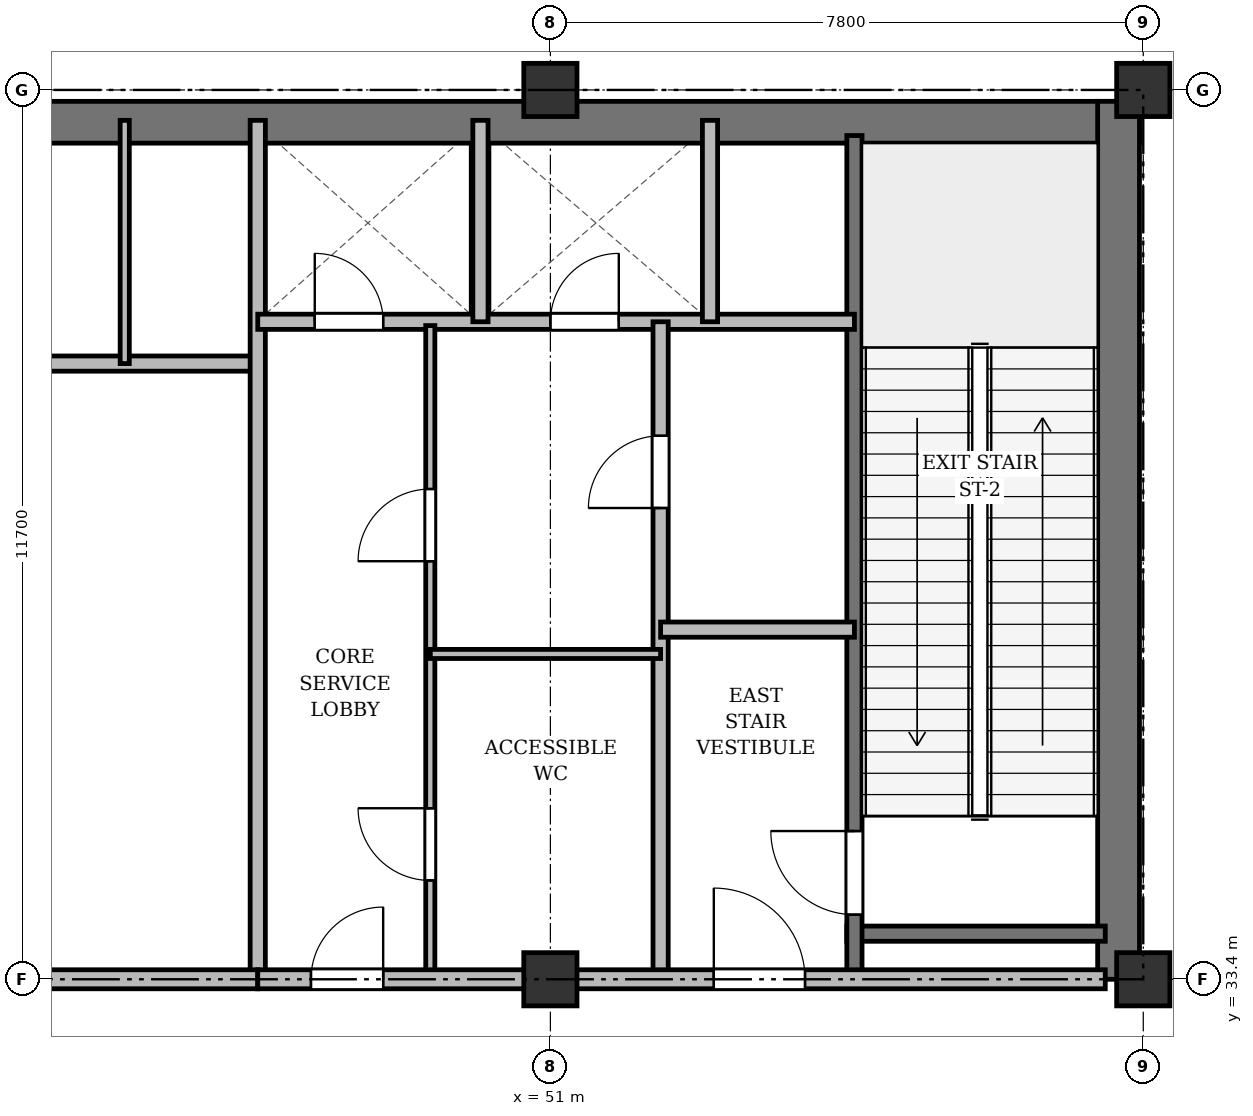
"""IFC4 building model, lengths in metres.
Left out: names, types, materials, properties, quantities, classifications, styles, units other than length and angle.
Written with IfcOpenShell. Run it as: python <this file> out.ifc"""

import sys

from ifc_helpers import new_model, si_unit, direction, frame, frame_2d, origin, origin_2d, place, context, subcontext, project, spatial, rectangle, extrude, source, transform, mapped, element, fill, save


model = new_model("IFC4")
c1 = context("Model", 3, precision=1e-05, world=origin(), true_north=direction((0.0, 1.0)))
c2 = subcontext(c1, "Body", "Model", "MODEL_VIEW")
j1 = project(units=[si_unit("LENGTHUNIT", "METRE"), si_unit("PLANEANGLEUNIT", "RADIAN")], contexts=[c1])
p1 = place(None, origin())
s1 = spatial("IfcSite", under=j1, at=p1, CompositionType="ELEMENT")
p2 = place(p1, origin())
s2 = spatial("IfcBuilding", under=s1, at=p2, CompositionType="ELEMENT")
p3 = place(p2, frame((0.0, 0.0, 182.5)))
s3 = spatial("IfcBuildingStorey", under=s2, at=p3, CompositionType="ELEMENT", Elevation=182.5)
m1 = source(origin(), c2, "Body", "SweptSolid", [
    extrude(rectangle(XDim=0.7, YDim=0.7, at=origin_2d()), origin(), (0.0, 0.0, 1.0), 8.0),
])
for number, where, z_axis, x_axis in (
    (1, (51.0, 33.4, 0.0), (0.0, 0.0, 1.0), (1.0, 0.0, 0.0)),
    (2, (51.0, 45.1, 0.0), (0.0, 0.0, 1.0), (1.0, 0.0, 0.0)),
    (3, (58.8, 33.4, 0.0), (0.0, 0.0, 1.0), (1.0, 0.0, 0.0)),
    (4, (58.8, 45.1, 0.0), (0.0, 0.0, 1.0), (1.0, 0.0, 0.0)),
):
    element("IfcColumn", number, at=place(p3, frame(where, z_axis=z_axis, x_axis=x_axis)), inside=s3, PredefinedType="COLUMN", context=c2, shape_type="MappedRepresentation", body=[
        mapped(m1, transform((0.0, 0.0, 0.0), x_axis=(1.0, 0.0, 0.0), y_axis=(0.0, 1.0, 0.0), z_axis=(0.0, 0.0, 1.0), scale=1.0)),
    ])
p4 = place(p3, frame((15.65, 44.675, 0.0), z_axis=(0.0, 0.0, 1.0), x_axis=(1.0, 0.0, 0.0)))
e5 = element("IfcWall", 5, at=p4, inside=s3, PredefinedType="SHEAR", context=c2, shape_type="SweptSolid", body=[
    extrude(rectangle(XDim=43.1, YDim=0.55, at=frame_2d((21.55, 0.0))), origin(), (0.0, 0.0, 1.0), 7.62),
])
p5 = place(p3, frame((58.475, 33.4, 0.0), z_axis=(0.0, 0.0, 1.0), x_axis=(0.0, 1.0, 0.0)))
e6 = element("IfcWall", 6, at=p5, inside=s3, PredefinedType="SHEAR", context=c2, shape_type="SweptSolid", body=[
    extrude(rectangle(XDim=11.55, YDim=0.55, at=frame_2d((5.775, 0.0))), origin(), (0.0, 0.0, 1.0), 7.62),
])
p6 = place(p3, frame((54.9, 34.0, 0.0), z_axis=(0.0, 0.0, 1.0), x_axis=(1.0, 0.0, 0.0)))
e7 = element("IfcWall", 7, at=p6, inside=s3, PredefinedType="SHEAR", context=c2, shape_type="SweptSolid", body=[
    extrude(rectangle(XDim=3.4, YDim=0.2, at=frame_2d((1.7, 0.0))), origin(), (0.0, 0.0, 1.0), 7.62),
])
p7 = place(p3, frame((55.0, 33.4, 0.0), z_axis=(0.0, 0.0, 1.0), x_axis=(0.0, 1.0, 0.0)))
e8 = element("IfcWall", 8, at=p7, inside=s3, PredefinedType="SHEAR", context=c2, shape_type="SweptSolid", body=[
    extrude(rectangle(XDim=11.1, YDim=0.2, at=frame_2d((5.55, 0.0))), origin(), (0.0, 0.0, 1.0), 7.62),
])
p8 = place(p7, frame((0.85, 0.0, 0.0)))
e9 = element("IfcOpeningElement", 9, at=p8, cuts=e8, PredefinedType="OPENING", context=c2, shape_type="SweptSolid", body=[
    extrude(rectangle(XDim=1.1, YDim=2.15, at=frame_2d((0.55, 1.075))), frame((0.0, 0.11, 0.0), z_axis=(0.0, -1.0, 0.0), x_axis=(1.0, 0.0, 0.0)), (0.0, 0.0, 1.0), 0.22),
])
p9 = place(p3, frame((40.25, 41.5, 0.0), z_axis=(0.0, 0.0, 1.0), x_axis=(1.0, 0.0, 0.0)))
e10 = element("IfcWall", 10, at=p9, inside=s3, PredefinedType="SOLIDWALL", context=c2, shape_type="SweptSolid", body=[
    extrude(rectangle(XDim=6.9, YDim=0.2, at=frame_2d((3.45, 0.0))), origin(), (0.0, 0.0, 1.0), 7.12),
])
p10 = place(p3, frame((45.4, 41.5, 0.0), z_axis=(0.0, 0.0, 1.0), x_axis=(0.0, 1.0, 0.0)))
e11 = element("IfcWall", 11, at=p10, inside=s3, PredefinedType="PARTITIONING", context=c2, shape_type="SweptSolid", body=[
    extrude(rectangle(XDim=3.2, YDim=0.12, at=frame_2d((1.6, 0.0))), origin(), (0.0, 0.0, 1.0), 7.62),
])
p11 = place(p3, frame((47.15, 33.4, 0.0), z_axis=(0.0, 0.0, 1.0), x_axis=(0.0, 1.0, 0.0)))
e12 = element("IfcWall", 12, at=p11, inside=s3, PredefinedType="SOLIDWALL", context=c2, shape_type="SweptSolid", body=[
    extrude(rectangle(XDim=11.3, YDim=0.2, at=frame_2d((5.65, 0.0))), origin(), (0.0, 0.0, 1.0), 7.02),
])
p12 = place(p3, frame((33.3, 33.4, 0.0), z_axis=(0.0, 0.0, 1.0), x_axis=(1.0, 0.0, 0.0)))
e13 = element("IfcWall", 13, at=p12, inside=s3, PredefinedType="PARTITIONING", context=c2, shape_type="SweptSolid", body=[
    extrude(rectangle(XDim=13.85, YDim=0.25, at=frame_2d((6.925, 0.0))), origin(), (0.0, 0.0, 1.0), 7.02),
])
p13 = place(p12, frame((4.2, 0.0, 0.0)))
e14 = element("IfcOpeningElement", 14, at=p13, cuts=e13, PredefinedType="OPENING", context=c2, shape_type="SweptSolid", body=[
    extrude(rectangle(XDim=1.6, YDim=2.2, at=frame_2d((0.8, 1.1))), frame((0.0, 0.135, 0.0), z_axis=(0.0, -1.0, 0.0), x_axis=(1.0, 0.0, 0.0)), (0.0, 0.0, 1.0), 0.27),
])
p14 = place(p3, frame((47.15, 42.05, 0.0), z_axis=(0.0, 0.0, 1.0), x_axis=(1.0, 0.0, 0.0)))
e15 = element("IfcWall", 15, at=p14, inside=s3, PredefinedType="SOLIDWALL", context=c2, shape_type="SweptSolid", body=[
    extrude(rectangle(XDim=7.85, YDim=0.2, at=frame_2d((3.925, 0.0))), origin(), (0.0, 0.0, 1.0), 7.12),
])
p15 = place(p14, frame((0.75, 0.0, 0.0)))
e16 = element("IfcOpeningElement", 16, at=p15, cuts=e15, PredefinedType="OPENING", context=c2, shape_type="SweptSolid", body=[
    extrude(rectangle(XDim=0.9, YDim=2.1, at=frame_2d((0.45, 1.05))), frame((0.0, 0.11, 0.0), z_axis=(0.0, -1.0, 0.0), x_axis=(1.0, 0.0, 0.0)), (0.0, 0.0, 1.0), 0.22),
])
p16 = place(p14, frame((3.85, 0.0, 0.0)))
e17 = element("IfcOpeningElement", 17, at=p16, cuts=e15, PredefinedType="OPENING", context=c2, shape_type="SweptSolid", body=[
    extrude(rectangle(XDim=0.9, YDim=2.1, at=frame_2d((0.45, 1.05))), frame((0.0, 0.11, 0.0), z_axis=(0.0, -1.0, 0.0), x_axis=(1.0, 0.0, 0.0)), (0.0, 0.0, 1.0), 0.22),
])
for number, where, z_axis, x_axis in (
    (18, (50.08, 42.05, 0.0), (0.0, 0.0, 1.0), (0.0, 1.0, 0.0)),
    (19, (53.1, 42.05, 0.0), (0.0, 0.0, 1.0), (0.0, 1.0, 0.0)),
):
    element("IfcWall", number, at=place(p3, frame(where, z_axis=z_axis, x_axis=x_axis)), inside=s3, PredefinedType="SOLIDWALL", context=c2, shape_type="SweptSolid", body=[
        extrude(rectangle(XDim=2.65, YDim=0.2, at=frame_2d((1.325, 0.0))), origin(), (0.0, 0.0, 1.0), 7.62),
    ])
p17 = place(p3, frame((52.45, 33.4, 0.0), z_axis=(0.0, 0.0, 1.0), x_axis=(0.0, 1.0, 0.0)))
e20 = element("IfcWall", 20, at=p17, inside=s3, PredefinedType="PARTITIONING", context=c2, shape_type="SweptSolid", body=[
    extrude(rectangle(XDim=8.65, YDim=0.2, at=frame_2d((4.325, 0.0))), origin(), (0.0, 0.0, 1.0), 7.02),
])
p18 = place(p17, frame((6.2, 0.0, 0.0)))
e21 = element("IfcOpeningElement", 21, at=p18, cuts=e20, PredefinedType="OPENING", context=c2, shape_type="SweptSolid", body=[
    extrude(rectangle(XDim=0.95, YDim=2.15, at=frame_2d((0.475, 1.075))), frame((0.0, 0.11, 0.0), z_axis=(0.0, -1.0, 0.0), x_axis=(1.0, 0.0, 0.0)), (0.0, 0.0, 1.0), 0.22),
])
p19 = place(p3, frame((52.45, 38.0, 0.0), z_axis=(0.0, 0.0, 1.0), x_axis=(1.0, 0.0, 0.0)))
e22 = element("IfcWall", 22, at=p19, inside=s3, PredefinedType="PARTITIONING", context=c2, shape_type="SweptSolid", body=[
    extrude(rectangle(XDim=2.55, YDim=0.2, at=frame_2d((1.275, 0.0))), origin(), (0.0, 0.0, 1.0), 7.62),
])
p20 = place(p3, frame((49.42, 33.4, 0.0), z_axis=(0.0, 0.0, 1.0), x_axis=(0.0, 1.0, 0.0)))
e23 = element("IfcWall", 23, at=p20, inside=s3, PredefinedType="PARTITIONING", context=c2, shape_type="SweptSolid", body=[
    extrude(rectangle(XDim=8.6, YDim=0.12, at=frame_2d((4.3, 0.0))), origin(), (0.0, 0.0, 1.0), 7.02),
])
p21 = place(p20, frame((1.3, 0.0, 0.0)))
e24 = element("IfcOpeningElement", 24, at=p21, cuts=e23, PredefinedType="OPENING", context=c2, shape_type="SweptSolid", body=[
    extrude(rectangle(XDim=0.95, YDim=2.15, at=frame_2d((0.475, 1.075))), frame((0.0, 0.07, 0.0), z_axis=(0.0, -1.0, 0.0), x_axis=(1.0, 0.0, 0.0)), (0.0, 0.0, 1.0), 0.14),
])
p22 = place(p20, frame((5.5, 0.0, 0.0)))
e25 = element("IfcOpeningElement", 25, at=p22, cuts=e23, PredefinedType="OPENING", context=c2, shape_type="SweptSolid", body=[
    extrude(rectangle(XDim=0.95, YDim=2.15, at=frame_2d((0.475, 1.075))), frame((0.0, 0.07, 0.0), z_axis=(0.0, -1.0, 0.0), x_axis=(1.0, 0.0, 0.0)), (0.0, 0.0, 1.0), 0.14),
])
p23 = place(p3, frame((49.42, 37.68, 0.0), z_axis=(0.0, 0.0, 1.0), x_axis=(1.0, 0.0, 0.0)))
e26 = element("IfcWall", 26, at=p23, inside=s3, PredefinedType="PARTITIONING", context=c2, shape_type="SweptSolid", body=[
    extrude(rectangle(XDim=3.03, YDim=0.12, at=frame_2d((1.515, 0.0))), origin(), (0.0, 0.0, 1.0), 7.12),
])
p24 = place(p3, frame((47.15, 33.4, 0.0), z_axis=(0.0, 0.0, 1.0), x_axis=(1.0, 0.0, 0.0)))
e27 = element("IfcWall", 27, at=p24, inside=s3, PredefinedType="PARTITIONING", context=c2, shape_type="SweptSolid", body=[
    extrude(rectangle(XDim=11.15, YDim=0.25, at=frame_2d((5.575, 0.0))), origin(), (0.0, 0.0, 1.0), 7.02),
])
p25 = place(p24, frame((0.7, 0.0, 0.0)))
e28 = element("IfcOpeningElement", 28, at=p25, cuts=e27, PredefinedType="OPENING", context=c2, shape_type="SweptSolid", body=[
    extrude(rectangle(XDim=0.95, YDim=2.15, at=frame_2d((0.475, 1.075))), frame((0.0, 0.135, 0.0), z_axis=(0.0, -1.0, 0.0), x_axis=(1.0, 0.0, 0.0)), (0.0, 0.0, 1.0), 0.27),
])
p26 = place(p24, frame((6.0, 0.0, 0.0)))
e29 = element("IfcOpeningElement", 29, at=p26, cuts=e27, PredefinedType="OPENING", context=c2, shape_type="SweptSolid", body=[
    extrude(rectangle(XDim=1.2, YDim=2.15, at=frame_2d((0.6, 1.075))), frame((0.0, 0.135, 0.0), z_axis=(0.0, -1.0, 0.0), x_axis=(1.0, 0.0, 0.0)), (0.0, 0.0, 1.0), 0.27),
])
m2 = source(origin(), c2, "Body", "SweptSolid", [
    extrude(rectangle(XDim=1.1, YDim=2.15, at=frame_2d((0.55, 1.075))), frame((0.0, 0.025, 0.0), z_axis=(0.0, -1.0, 0.0), x_axis=(1.0, 0.0, 0.0)), (0.0, 0.0, 1.0), 0.05),
])
p27 = place(p8, origin())
e30 = element("IfcDoor", 30, at=p27, inside=s3, OperationType="SINGLE_SWING_RIGHT", PredefinedType="DOOR", context=c2, shape_type="MappedRepresentation", body=[
    mapped(m2, transform((0.0, 0.0, 0.0), x_axis=(1.0, 0.0, 0.0), y_axis=(0.0, 1.0, 0.0), z_axis=(0.0, 0.0, 1.0), scale=1.0)),
])
fill(e9, e30)
m3 = source(origin(), c2, "Body", "SweptSolid", [
    extrude(rectangle(XDim=0.9, YDim=2.1, at=frame_2d((0.45, 1.05))), frame((0.0, 0.025, 0.0), z_axis=(0.0, -1.0, 0.0), x_axis=(1.0, 0.0, 0.0)), (0.0, 0.0, 1.0), 0.05),
])
p28 = place(p15, origin())
e31 = element("IfcDoor", 31, at=p28, inside=s3, OperationType="SINGLE_SWING_LEFT", PredefinedType="DOOR", context=c2, shape_type="MappedRepresentation", body=[
    mapped(m3, transform((0.0, 0.0, 0.0), x_axis=(1.0, 0.0, 0.0), y_axis=(0.0, 1.0, 0.0), z_axis=(0.0, 0.0, 1.0), scale=1.0)),
])
fill(e16, e31)
p29 = place(p16, origin())
e32 = element("IfcDoor", 32, at=p29, inside=s3, OperationType="SINGLE_SWING_RIGHT", PredefinedType="DOOR", context=c2, shape_type="MappedRepresentation", body=[
    mapped(m3, transform((0.0, 0.0, 0.0), x_axis=(1.0, 0.0, 0.0), y_axis=(0.0, 1.0, 0.0), z_axis=(0.0, 0.0, 1.0), scale=1.0)),
])
fill(e17, e32)
m4 = source(origin(), c2, "Body", "SweptSolid", [
    extrude(rectangle(XDim=0.95, YDim=2.15, at=frame_2d((0.475, 1.075))), frame((0.0, 0.025, 0.0), z_axis=(0.0, -1.0, 0.0), x_axis=(1.0, 0.0, 0.0)), (0.0, 0.0, 1.0), 0.05),
])
p30 = place(p18, origin())
e33 = element("IfcDoor", 33, at=p30, inside=s3, OperationType="SINGLE_SWING_LEFT", PredefinedType="DOOR", context=c2, shape_type="MappedRepresentation", body=[
    mapped(m4, transform((0.0, 0.0, 0.0), x_axis=(1.0, 0.0, 0.0), y_axis=(0.0, 1.0, 0.0), z_axis=(0.0, 0.0, 1.0), scale=1.0)),
])
fill(e21, e33)
p31 = place(p21, origin())
e34 = element("IfcDoor", 34, at=p31, inside=s3, OperationType="SINGLE_SWING_RIGHT", PredefinedType="DOOR", context=c2, shape_type="MappedRepresentation", body=[
    mapped(m4, transform((0.0, 0.0, 0.0), x_axis=(1.0, 0.0, 0.0), y_axis=(0.0, 1.0, 0.0), z_axis=(0.0, 0.0, 1.0), scale=1.0)),
])
fill(e24, e34)
p32 = place(p22, origin())
e35 = element("IfcDoor", 35, at=p32, inside=s3, OperationType="SINGLE_SWING_LEFT", PredefinedType="DOOR", context=c2, shape_type="MappedRepresentation", body=[
    mapped(m4, transform((0.0, 0.0, 0.0), x_axis=(1.0, 0.0, 0.0), y_axis=(0.0, 1.0, 0.0), z_axis=(0.0, 0.0, 1.0), scale=1.0)),
])
fill(e25, e35)
p33 = place(p25, origin())
e36 = element("IfcDoor", 36, at=p33, inside=s3, OperationType="SINGLE_SWING_RIGHT", PredefinedType="DOOR", context=c2, shape_type="MappedRepresentation", body=[
    mapped(m4, transform((0.0, 0.0, 0.0), x_axis=(1.0, 0.0, 0.0), y_axis=(0.0, 1.0, 0.0), z_axis=(0.0, 0.0, 1.0), scale=1.0)),
])
fill(e28, e36)
m5 = source(origin(), c2, "Body", "SweptSolid", [
    extrude(rectangle(XDim=1.2, YDim=2.15, at=frame_2d((0.6, 1.075))), frame((0.0, 0.025, 0.0), z_axis=(0.0, -1.0, 0.0), x_axis=(1.0, 0.0, 0.0)), (0.0, 0.0, 1.0), 0.05),
])
p34 = place(p26, origin())
e37 = element("IfcDoor", 37, at=p34, inside=s3, OperationType="SINGLE_SWING_LEFT", PredefinedType="DOOR", context=c2, shape_type="MappedRepresentation", body=[
    mapped(m5, transform((0.0, 0.0, 0.0), x_axis=(1.0, 0.0, 0.0), y_axis=(0.0, 1.0, 0.0), z_axis=(0.0, 0.0, 1.0), scale=1.0)),
])
fill(e29, e37)
save(model, sys.argv[1])
